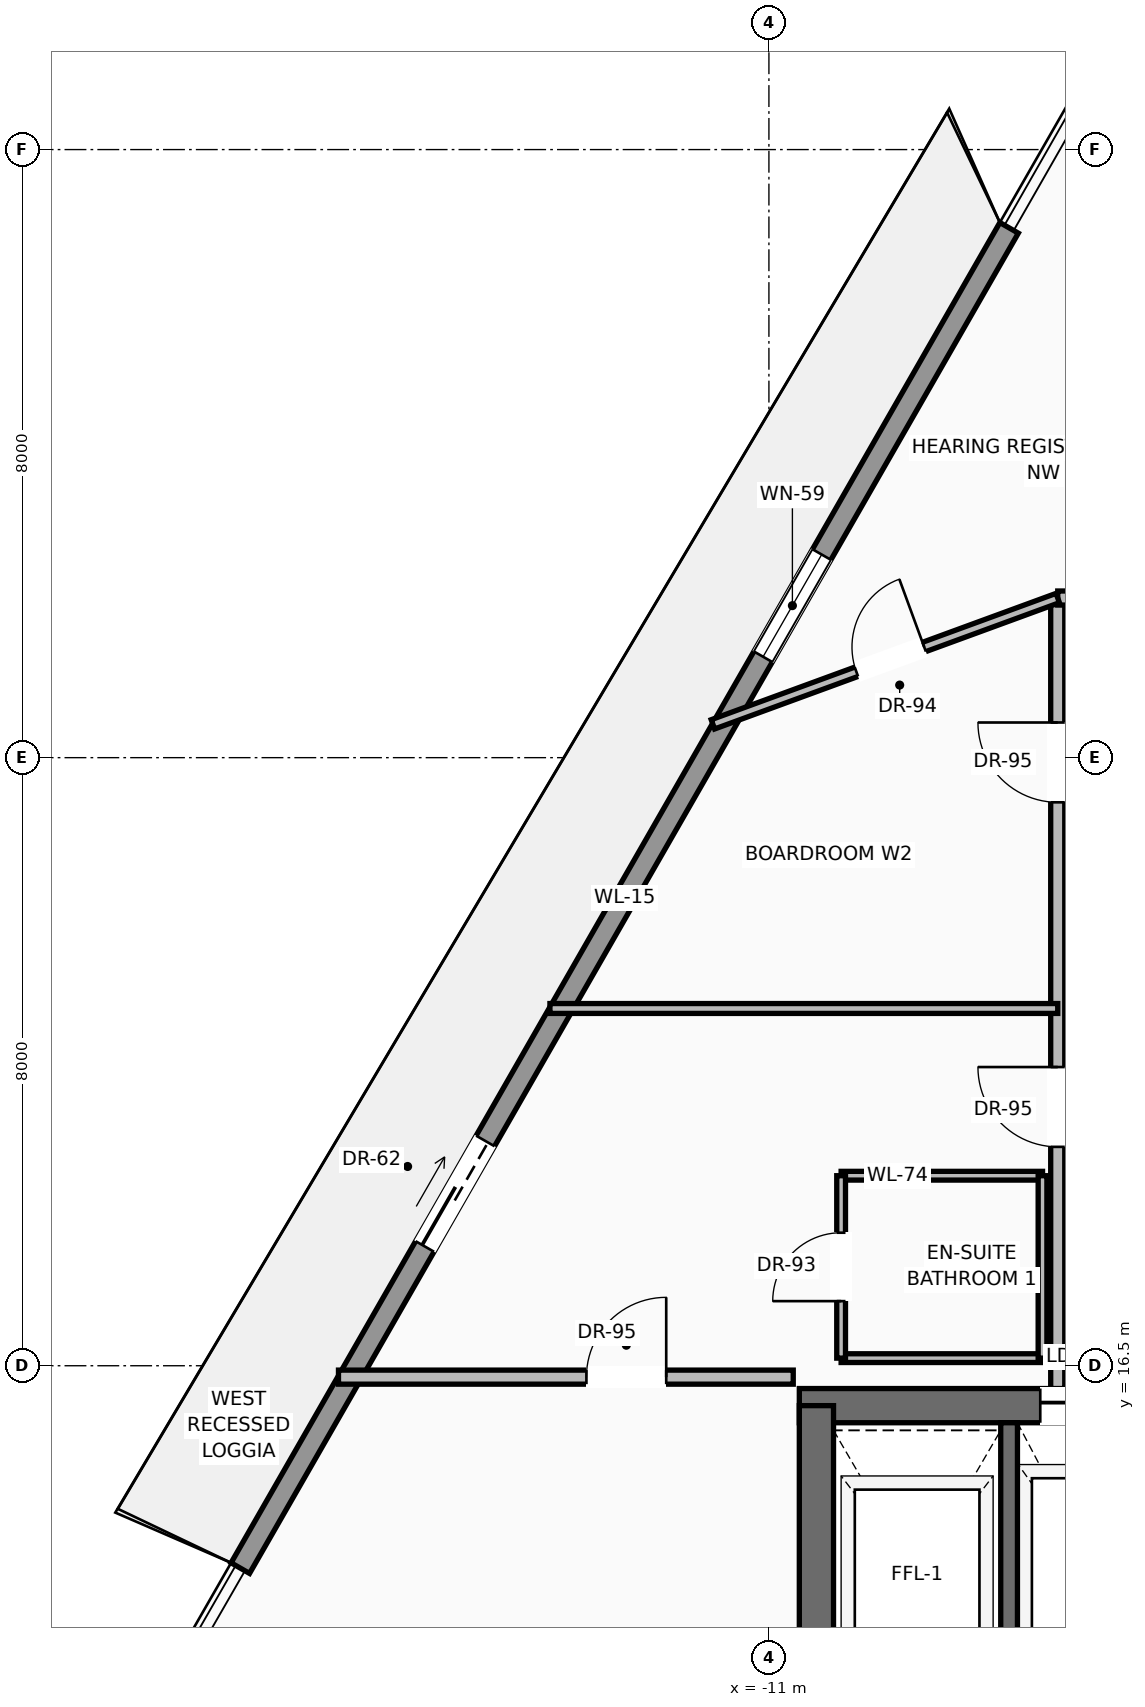
"""IFC4 building model, lengths in metres.
Left out: names, types, materials, properties, quantities, classifications, styles, units other than length and angle.
Written with IfcOpenShell. Run it as: python <this file> out.ifc"""

import sys

from ifc_helpers import new_model, si_unit, direction, frame, frame_2d, origin, place, context, subcontext, project, spatial, rectangle, extrude, source, transform, mapped, element, fill, save


model = new_model("IFC4")
c1 = context("Model", 3, precision=1e-05, world=origin(), true_north=direction((0.0, 1.0)))
c2 = subcontext(c1, "Body", "Model", "MODEL_VIEW")
j1 = project(units=[si_unit("LENGTHUNIT", "METRE"), si_unit("PLANEANGLEUNIT", "RADIAN")], contexts=[c1])
p1 = place(None, origin())
s1 = spatial("IfcSite", under=j1, at=p1, CompositionType="ELEMENT")
p2 = place(p1, origin())
s2 = spatial("IfcBuilding", under=s1, at=p2, CompositionType="ELEMENT")
p3 = place(p2, frame((0.0, 0.0, 293.7)))
s3 = spatial("IfcBuildingStorey", under=s2, at=p3, CompositionType="ELEMENT", Elevation=293.7)
p4 = place(p3, frame((-10.6, 15.975, 0.0), z_axis=(0.0, 0.0, 1.0), x_axis=(1.0, 0.0, 0.0)))
e1 = element("IfcWall", 1, at=p4, inside=s3, PredefinedType="SHEAR", context=c2, shape_type="SweptSolid", body=[
    extrude(rectangle(XDim=21.2, YDim=0.45, at=frame_2d((10.6, 0.0))), origin(), (0.0, 0.0, 1.0), 3.24),
])
p5 = place(p4, frame((3.17, 0.0, 0.0)))
e2 = element("IfcOpeningElement", 2, at=p5, cuts=e1, PredefinedType="OPENING", context=c2, shape_type="SweptSolid", body=[
    extrude(rectangle(XDim=1.3, YDim=2.3, at=frame_2d((0.65, 1.15))), frame((0.0, 0.235, 0.0), z_axis=(0.0, -1.0, 0.0), x_axis=(1.0, 0.0, 0.0)), (0.0, 0.0, 1.0), 0.47),
])
p6 = place(p4, frame((9.6, 0.0, 0.0)))
e3 = element("IfcOpeningElement", 3, at=p6, cuts=e1, PredefinedType="OPENING", context=c2, shape_type="SweptSolid", body=[
    extrude(rectangle(XDim=2.0, YDim=2.4, at=frame_2d((1.0, 1.2))), frame((0.0, 0.235, 0.0), z_axis=(0.0, -1.0, 0.0), x_axis=(1.0, 0.0, 0.0)), (0.0, 0.0, 1.0), 0.47),
])
p7 = place(p3, frame((-10.375, 0.625, 0.0), z_axis=(0.0, 0.0, 1.0), x_axis=(0.0, 1.0, 0.0)))
e4 = element("IfcWall", 4, at=p7, inside=s3, PredefinedType="SHEAR", context=c2, shape_type="SweptSolid", body=[
    extrude(rectangle(XDim=15.35, YDim=0.45, at=frame_2d((7.675, 0.0))), origin(), (0.0, 0.0, 1.0), 3.24),
])
p8 = place(p3, frame((-17.955, 13.837, 0.0), z_axis=(0.0, 0.0, 1.0), x_axis=(0.49757006288, 0.867423790616, 0.0)))
e5 = element("IfcWall", 5, at=p8, inside=s3, PredefinedType="SOLIDWALL", context=c2, shape_type="SweptSolid", body=[
    extrude(rectangle(XDim=20.328, YDim=0.28, at=frame_2d((10.164, 0.0))), origin(), (0.0, 0.0, 1.0), 2.82),
])
p9 = place(p8, frame((4.879, 0.0, 0.0)))
e6 = element("IfcOpeningElement", 6, at=p9, cuts=e5, PredefinedType="OPENING", context=c2, shape_type="SweptSolid", body=[
    extrude(rectangle(XDim=1.6, YDim=2.35, at=frame_2d((0.8, 1.175))), frame((0.0, 0.15, 0.0), z_axis=(0.0, -1.0, 0.0), x_axis=(1.0, 0.0, 0.0)), (0.0, 0.0, 1.0), 0.3),
])
p10 = place(p8, frame((13.823, 0.0, 0.9)))
e7 = element("IfcOpeningElement", 7, at=p10, cuts=e5, PredefinedType="OPENING", context=c2, shape_type="SweptSolid", body=[
    extrude(rectangle(XDim=1.55, YDim=1.75, at=frame_2d((0.775, 0.875))), frame((0.0, 0.15, 0.0), z_axis=(0.0, -1.0, 0.0), x_axis=(1.0, 0.0, 0.0)), (0.0, 0.0, 1.0), 0.3),
])
p11 = place(p3, frame((-7.84, 11.87, 0.0), z_axis=(0.0, 0.0, 1.0), x_axis=(0.0, 1.0, 0.0)))
e8 = element("IfcWall", 8, at=p11, inside=s3, PredefinedType="SOLIDWALL", context=c2, shape_type="SweptSolid", body=[
    extrude(rectangle(XDim=3.88, YDim=0.22, at=frame_2d((1.94, 0.0))), origin(), (0.0, 0.0, 1.0), 3.24),
])
p12 = place(p3, frame((-7.2, 16.2, 0.0), z_axis=(0.0, 0.0, 1.0), x_axis=(0.0, 1.0, 0.0)))
e9 = element("IfcWall", 9, at=p12, inside=s3, PredefinedType="PARTITIONING", context=c2, shape_type="SweptSolid", body=[
    extrude(rectangle(XDim=10.4, YDim=0.185, at=frame_2d((5.2, 0.0))), origin(), (0.0, 0.0, 1.0), 3.232),
])
p13 = place(p12, frame((3.18, 0.0, 0.0)))
e10 = element("IfcOpeningElement", 10, at=p13, cuts=e9, PredefinedType="OPENING", context=c2, shape_type="SweptSolid", body=[
    extrude(rectangle(XDim=1.05, YDim=2.25, at=frame_2d((0.525, 1.125))), frame((0.0, 0.103, 0.0), z_axis=(0.0, -1.0, 0.0), x_axis=(1.0, 0.0, 0.0)), (0.0, 0.0, 1.0), 0.205),
])
p14 = place(p12, frame((7.712, 0.0, 0.0)))
e11 = element("IfcOpeningElement", 11, at=p14, cuts=e9, PredefinedType="OPENING", context=c2, shape_type="SweptSolid", body=[
    extrude(rectangle(XDim=1.05, YDim=2.25, at=frame_2d((0.525, 1.125))), frame((0.0, 0.103, 0.0), z_axis=(0.0, -1.0, 0.0), x_axis=(1.0, 0.0, 0.0)), (0.0, 0.0, 1.0), 0.205),
])
p15 = place(p3, frame((-7.2, 26.6, 0.0), z_axis=(0.0, 0.0, 1.0), x_axis=(1.0, 0.0, 0.0)))
e12 = element("IfcWall", 12, at=p15, inside=s3, PredefinedType="PARTITIONING", context=c2, shape_type="SweptSolid", body=[
    extrude(rectangle(XDim=14.4, YDim=0.185, at=frame_2d((7.2, 0.0))), origin(), (0.0, 0.0, 1.0), 3.232),
])
p16 = place(p15, frame((4.698, 0.0, 0.0)))
e13 = element("IfcOpeningElement", 13, at=p16, cuts=e12, PredefinedType="OPENING", context=c2, shape_type="SweptSolid", body=[
    extrude(rectangle(XDim=1.05, YDim=2.25, at=frame_2d((0.525, 1.125))), frame((0.0, 0.103, 0.0), z_axis=(0.0, -1.0, 0.0), x_axis=(1.0, 0.0, 0.0)), (0.0, 0.0, 1.0), 0.205),
])
p17 = place(p15, frame((6.675, 0.0, 0.0)))
e14 = element("IfcOpeningElement", 14, at=p17, cuts=e12, PredefinedType="OPENING", context=c2, shape_type="SweptSolid", body=[
    extrude(rectangle(XDim=1.05, YDim=2.25, at=frame_2d((0.525, 1.125))), frame((0.0, 0.103, 0.0), z_axis=(0.0, -1.0, 0.0), x_axis=(1.0, 0.0, 0.0)), (0.0, 0.0, 1.0), 0.205),
])
p18 = place(p15, frame((8.653, 0.0, 0.0)))
e15 = element("IfcOpeningElement", 15, at=p18, cuts=e12, PredefinedType="OPENING", context=c2, shape_type="SweptSolid", body=[
    extrude(rectangle(XDim=1.05, YDim=2.25, at=frame_2d((0.525, 1.125))), frame((0.0, 0.103, 0.0), z_axis=(0.0, -1.0, 0.0), x_axis=(1.0, 0.0, 0.0)), (0.0, 0.0, 1.0), 0.205),
])
p19 = place(p3, frame((-16.663, 16.35, 0.0), z_axis=(0.0, 0.0, 1.0), x_axis=(1.0, 0.0, 0.0)))
e16 = element("IfcWall", 16, at=p19, inside=s3, PredefinedType="PARTITIONING", context=c2, shape_type="SweptSolid", body=[
    extrude(rectangle(XDim=5.983, YDim=0.185, at=frame_2d((2.992, 0.0))), origin(), (0.0, 0.0, 1.0), 3.232),
])
p20 = place(p19, frame((3.262, 0.0, 0.0)))
e17 = element("IfcOpeningElement", 17, at=p20, cuts=e16, PredefinedType="OPENING", context=c2, shape_type="SweptSolid", body=[
    extrude(rectangle(XDim=1.05, YDim=2.25, at=frame_2d((0.525, 1.125))), frame((0.0, 0.103, 0.0), z_axis=(0.0, -1.0, 0.0), x_axis=(1.0, 0.0, 0.0)), (0.0, 0.0, 1.0), 0.205),
])
p21 = place(p3, frame((-11.737, 24.938, 0.0), z_axis=(0.0, 0.0, 1.0), x_axis=(0.938986778796, 0.343953237005, 0.0)))
e18 = element("IfcWall", 18, at=p21, inside=s3, PredefinedType="PARTITIONING", context=c2, shape_type="SweptSolid", body=[
    extrude(rectangle(XDim=4.832, YDim=0.13, at=frame_2d((2.416, 0.0))), origin(), (0.0, 0.0, 1.0), 3.232),
])
p22 = place(p21, frame((2.01, 0.0, 0.0)))
e19 = element("IfcOpeningElement", 19, at=p22, cuts=e18, PredefinedType="OPENING", context=c2, shape_type="SweptSolid", body=[
    extrude(rectangle(XDim=0.95, YDim=2.2, at=frame_2d((0.475, 1.1))), frame((0.0, 0.075, 0.0), z_axis=(0.0, -1.0, 0.0), x_axis=(1.0, 0.0, 0.0)), (0.0, 0.0, 1.0), 0.15),
])
for number, where, z_axis, x_axis in (
    (20, (-10.05, 16.6, 0.0), (0.0, 0.0, 1.0), (1.0, 0.0, 0.0)),
    (21, (-10.05, 19.0, 0.0), (0.0, 0.0, 1.0), (1.0, 0.0, 0.0)),
):
    element("IfcWall", number, at=place(p3, frame(where, z_axis=z_axis, x_axis=x_axis)), inside=s3, PredefinedType="PARTITIONING", context=c2, shape_type="SweptSolid", body=[
        extrude(rectangle(XDim=2.65, YDim=0.115, at=frame_2d((1.325, 0.0))), origin(), (0.0, 0.0, 1.0), 3.232),
    ])
p23 = place(p3, frame((-10.05, 16.6, 0.0), z_axis=(0.0, 0.0, 1.0), x_axis=(0.0, 1.0, 0.0)))
e22 = element("IfcWall", 22, at=p23, inside=s3, PredefinedType="PARTITIONING", context=c2, shape_type="SweptSolid", body=[
    extrude(rectangle(XDim=2.4, YDim=0.115, at=frame_2d((1.2, 0.0))), origin(), (0.0, 0.0, 1.0), 3.232),
])
p24 = place(p23, frame((0.75, 0.0, 0.0)))
e23 = element("IfcOpeningElement", 23, at=p24, cuts=e22, PredefinedType="OPENING", context=c2, shape_type="SweptSolid", body=[
    extrude(rectangle(XDim=0.9, YDim=2.15, at=frame_2d((0.45, 1.075))), frame((0.0, 0.067, 0.0), z_axis=(0.0, -1.0, 0.0), x_axis=(1.0, 0.0, 0.0)), (0.0, 0.0, 1.0), 0.135),
])
p25 = place(p3, frame((-7.4, 16.6, 0.0), z_axis=(0.0, 0.0, 1.0), x_axis=(0.0, 1.0, 0.0)))
e24 = element("IfcWall", 24, at=p25, inside=s3, PredefinedType="PARTITIONING", context=c2, shape_type="SweptSolid", body=[
    extrude(rectangle(XDim=2.4, YDim=0.115, at=frame_2d((1.2, 0.0))), origin(), (0.0, 0.0, 1.0), 3.232),
])
p26 = place(p3, frame((-13.881, 21.2, 0.0), z_axis=(0.0, 0.0, 1.0), x_axis=(1.0, 0.0, 0.0)))
e25 = element("IfcWall", 25, at=p26, inside=s3, PredefinedType="PARTITIONING", context=c2, shape_type="SweptSolid", body=[
    extrude(rectangle(XDim=6.681, YDim=0.13, at=frame_2d((3.341, 0.0))), origin(), (0.0, 0.0, 1.0), 3.232),
])
m1 = source(origin(), c2, "Body", "SweptSolid", [
    extrude(rectangle(XDim=1.6, YDim=2.35, at=frame_2d((0.8, 1.175))), frame((0.0, 0.025, 0.0), z_axis=(0.0, -1.0, 0.0), x_axis=(1.0, 0.0, 0.0)), (0.0, 0.0, 1.0), 0.05),
])
p27 = place(p9, origin())
e26 = element("IfcDoor", 26, at=p27, inside=s3, OperationType="SLIDING_TO_LEFT", PredefinedType="DOOR", context=c2, shape_type="MappedRepresentation", body=[
    mapped(m1, transform((0.0, 0.0, 0.0), scale=1.0)),
])
fill(e6, e26)
m2 = source(origin(), c2, "Body", "SweptSolid", [
    extrude(rectangle(XDim=1.55, YDim=1.75, at=frame_2d((0.775, 0.875))), frame((0.0, 0.03, 0.0), z_axis=(0.0, -1.0, 0.0), x_axis=(1.0, 0.0, 0.0)), (0.0, 0.0, 1.0), 0.06),
])
p28 = place(p10, origin())
e27 = element("IfcWindow", 27, at=p28, inside=s3, PartitioningType="SINGLE_PANEL", PredefinedType="WINDOW", context=c2, shape_type="MappedRepresentation", body=[
    mapped(m2, transform((0.0, 0.0, 0.0), scale=1.0)),
])
fill(e7, e27)
m3 = source(origin(), c2, "Body", "SweptSolid", [
    extrude(rectangle(XDim=1.3, YDim=2.3, at=frame_2d((0.65, 1.15))), frame((0.0, 0.025, 0.0), z_axis=(0.0, -1.0, 0.0), x_axis=(1.0, 0.0, 0.0)), (0.0, 0.0, 1.0), 0.05),
])
p29 = place(p5, origin())
e28 = element("IfcDoor", 28, at=p29, inside=s3, OperationType="SLIDING_TO_RIGHT", PredefinedType="DOOR", context=c2, shape_type="MappedRepresentation", body=[
    mapped(m3, transform((0.0, 0.0, 0.0), scale=1.0)),
])
fill(e2, e28)
m4 = source(origin(), c2, "Body", "SweptSolid", [
    extrude(rectangle(XDim=1.05, YDim=2.25, at=frame_2d((0.525, 1.125))), frame((0.0, 0.025, 0.0), z_axis=(0.0, -1.0, 0.0), x_axis=(1.0, 0.0, 0.0)), (0.0, 0.0, 1.0), 0.05),
])
p30 = place(p20, origin())
e29 = element("IfcDoor", 29, at=p30, inside=s3, OperationType="SINGLE_SWING_RIGHT", PredefinedType="DOOR", context=c2, shape_type="MappedRepresentation", body=[
    mapped(m4, transform((0.0, 0.0, 0.0), scale=1.0)),
])
fill(e17, e29)
p31 = place(p13, origin())
e30 = element("IfcDoor", 30, at=p31, inside=s3, OperationType="SINGLE_SWING_RIGHT", PredefinedType="DOOR", context=c2, shape_type="MappedRepresentation", body=[
    mapped(m4, transform((0.0, 0.0, 0.0), scale=1.0)),
])
fill(e10, e30)
m5 = source(origin(), c2, "Body", "SweptSolid", [
    extrude(rectangle(XDim=0.9, YDim=2.15, at=frame_2d((0.45, 1.075))), frame((0.0, 0.025, 0.0), z_axis=(0.0, -1.0, 0.0), x_axis=(1.0, 0.0, 0.0)), (0.0, 0.0, 1.0), 0.05),
])
p32 = place(p24, origin())
e31 = element("IfcDoor", 31, at=p32, inside=s3, OperationType="SINGLE_SWING_LEFT", PredefinedType="DOOR", context=c2, shape_type="MappedRepresentation", body=[
    mapped(m5, transform((0.0, 0.0, 0.0), scale=1.0)),
])
fill(e23, e31)
p33 = place(p14, origin())
e32 = element("IfcDoor", 32, at=p33, inside=s3, OperationType="SINGLE_SWING_RIGHT", PredefinedType="DOOR", context=c2, shape_type="MappedRepresentation", body=[
    mapped(m4, transform((0.0, 0.0, 0.0), scale=1.0)),
])
fill(e11, e32)
m6 = source(origin(), c2, "Body", "SweptSolid", [
    extrude(rectangle(XDim=0.95, YDim=2.2, at=frame_2d((0.475, 1.1))), frame((0.0, 0.025, 0.0), z_axis=(0.0, -1.0, 0.0), x_axis=(1.0, 0.0, 0.0)), (0.0, 0.0, 1.0), 0.05),
])
p34 = place(p22, origin())
e33 = element("IfcDoor", 33, at=p34, inside=s3, OperationType="SINGLE_SWING_RIGHT", PredefinedType="DOOR", context=c2, shape_type="MappedRepresentation", body=[
    mapped(m6, transform((0.0, 0.0, 0.0), scale=1.0)),
])
fill(e19, e33)
save(model, sys.argv[1])
